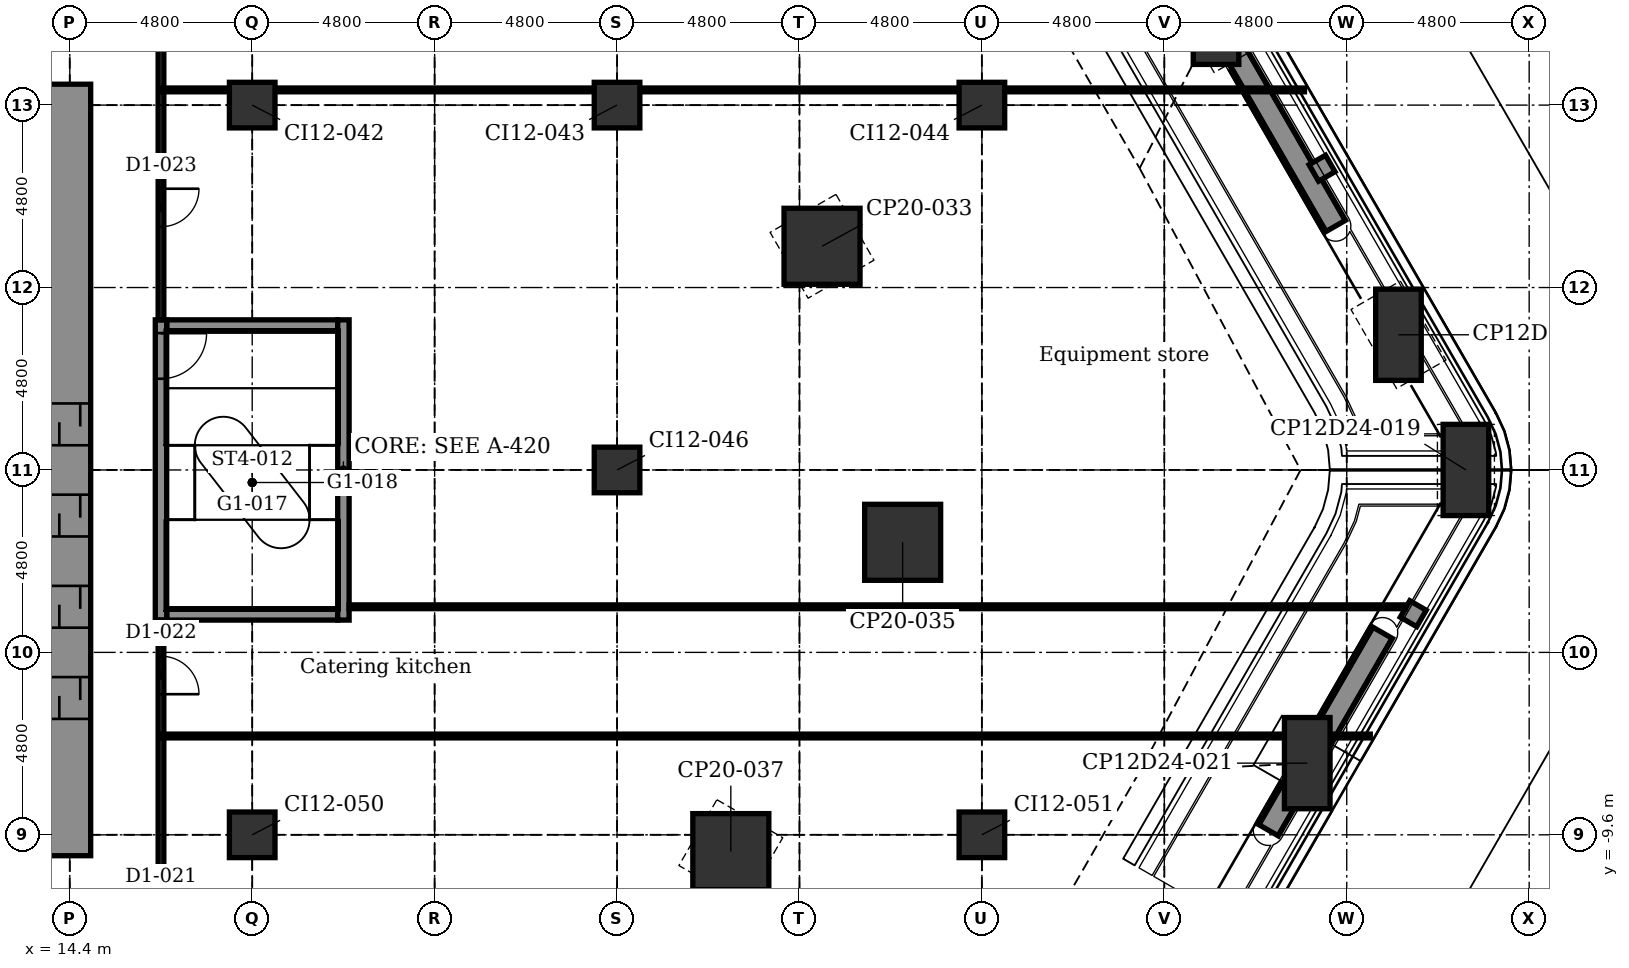
"""IFC4 building model, lengths in metres.
Left out: names, types, materials, properties, quantities, classifications, styles, units other than length and angle.
Written with IfcOpenShell. Run it as: python <this file> out.ifc"""

import sys

from ifc_helpers import new_model, si_unit, direction, frame, frame_2d, origin, origin_2d, place, context, subcontext, project, spatial, rectangle, extrude, element, fill, save


model = new_model("IFC4")
c1 = context("Model", 3, precision=1e-05, world=origin(), true_north=direction((0.0, 1.0)))
c2 = subcontext(c1, "Body", "Model", "MODEL_VIEW")
j1 = project(units=[si_unit("LENGTHUNIT", "METRE"), si_unit("PLANEANGLEUNIT", "RADIAN")], contexts=[c1])
p1 = place(None, origin())
s1 = spatial("IfcSite", under=j1, at=p1, CompositionType="ELEMENT")
p2 = place(p1, origin())
s2 = spatial("IfcBuilding", under=s1, at=p2, CompositionType="ELEMENT")
p3 = place(p2, frame((0.0, 0.0, 7.0)))
s3 = spatial("IfcBuildingStorey", under=s2, at=p3, CompositionType="ELEMENT", Elevation=7.0)
for number, where, z_axis, x_axis in (
    (1, (44.561, 11.871, -0.3), (0.0, 0.0, 1.0), (0.866, 0.5, 0.0)),
    (2, (49.361, 3.557, -0.3), (0.0, 0.0, 1.0), (0.866, 0.5, 0.0)),
    (3, (51.136, 0.0, -0.3), (0.0, 0.0, 1.0), (1.0, 0.0, 0.0)),
    (4, (46.961, -7.714, -0.3), (0.0, 0.0, 1.0), (0.5, 0.866, 0.0)),
):
    element("IfcColumn", number, at=place(p3, frame(where, z_axis=z_axis, x_axis=x_axis)), inside=s3, PredefinedType="COLUMN", context=c2, shape_type="SweptSolid", body=[
        extrude(rectangle(XDim=1.2, YDim=2.4, at=origin_2d()), origin(), (0.0, 0.0, 1.0), 5.4),
    ])
for number, where, z_axis, x_axis in (
    (5, (34.194, 5.885, -0.3), (0.0, 0.0, 1.0), (0.866, 0.5, 0.0)),
    (6, (36.315, -1.904, -0.3), (0.0, 0.0, 1.0), (1.0, 0.0, 0.0)),
    (7, (31.794, -10.042, -0.3), (0.0, 0.0, 1.0), (0.5, 0.866, 0.0)),
):
    element("IfcColumn", number, at=place(p3, frame(where, z_axis=z_axis, x_axis=x_axis)), inside=s3, PredefinedType="COLUMN", context=c2, shape_type="SweptSolid", body=[
        extrude(rectangle(XDim=2.0, YDim=2.0, at=origin_2d()), origin(), (0.0, 0.0, 1.0), 5.4),
    ])
for number, where, z_axis, x_axis in (
    (8, (19.2, -9.6, -0.3), (0.0, 0.0, 1.0), (1.0, 0.0, 0.0)),
    (9, (19.2, 9.6, -0.3), (0.0, 0.0, 1.0), (1.0, 0.0, 0.0)),
    (10, (28.8, 0.0, -0.3), (0.0, 0.0, 1.0), (1.0, 0.0, 0.0)),
    (11, (28.8, 9.6, -0.3), (0.0, 0.0, 1.0), (1.0, 0.0, 0.0)),
    (12, (38.4, -9.6, -0.3), (0.0, 0.0, 1.0), (1.0, 0.0, 0.0)),
    (13, (38.4, 9.6, -0.3), (0.0, 0.0, 1.0), (1.0, 0.0, 0.0)),
):
    element("IfcColumn", number, at=place(p3, frame(where, z_axis=z_axis, x_axis=x_axis)), inside=s3, PredefinedType="COLUMN", context=c2, shape_type="SweptSolid", body=[
        extrude(rectangle(XDim=1.2, YDim=1.2, at=origin_2d()), origin(), (0.0, 0.0, 1.0), 5.4),
    ])
for number, where, z_axis, x_axis in (
    (14, (16.95, -3.8, -0.3), (0.0, 0.0, 1.0), (1.0, 0.0, 0.0)),
    (15, (16.95, 3.8, -0.3), (0.0, 0.0, 1.0), (1.0, 0.0, 0.0)),
):
    element("IfcWall", number, at=place(p3, frame(where, z_axis=z_axis, x_axis=x_axis)), inside=s3, PredefinedType="STANDARD", context=c2, shape_type="SweptSolid", body=[
        extrude(rectangle(XDim=4.5, YDim=0.3, at=frame_2d((2.25, 0.0))), origin(), (0.0, 0.0, 1.0), 5.4),
    ])
p4 = place(p3, frame((14.4, -10.15, -0.3), z_axis=(0.0, 0.0, 1.0), x_axis=(0.0, 1.0, 0.0)))
e16 = element("IfcWall", 16, at=p4, inside=s3, PredefinedType="SHEAR", context=c2, shape_type="SweptSolid", body=[
    extrude(rectangle(XDim=20.3, YDim=1.1, at=frame_2d((10.15, 0.0))), origin(), (0.0, 0.0, 1.0), 5.4),
])
p5 = place(p4, frame((3.6, 0.0, 0.3)))
e17 = element("IfcOpeningElement", 17, at=p5, cuts=e16, PredefinedType="OPENING", context=c2, shape_type="SweptSolid", body=[
    extrude(rectangle(XDim=1.1, YDim=2.1, at=frame_2d((0.55, 1.05))), frame((0.0, 0.56, 0.0), z_axis=(0.0, -1.0, 0.0), x_axis=(1.0, 0.0, 0.0)), (0.0, 0.0, 1.0), 1.12),
])
p6 = place(p4, frame((6.0, 0.0, 0.3)))
e18 = element("IfcOpeningElement", 18, at=p6, cuts=e16, PredefinedType="OPENING", context=c2, shape_type="SweptSolid", body=[
    extrude(rectangle(XDim=1.1, YDim=2.1, at=frame_2d((0.55, 1.05))), frame((0.0, 0.56, 0.0), z_axis=(0.0, -1.0, 0.0), x_axis=(1.0, 0.0, 0.0)), (0.0, 0.0, 1.0), 1.12),
])
p7 = place(p4, frame((8.4, 0.0, 0.3)))
e19 = element("IfcOpeningElement", 19, at=p7, cuts=e16, PredefinedType="OPENING", context=c2, shape_type="SweptSolid", body=[
    extrude(rectangle(XDim=1.1, YDim=2.1, at=frame_2d((0.55, 1.05))), frame((0.0, 0.56, 0.0), z_axis=(0.0, -1.0, 0.0), x_axis=(1.0, 0.0, 0.0)), (0.0, 0.0, 1.0), 1.12),
])
p8 = place(p4, frame((10.8, 0.0, 0.3)))
e20 = element("IfcOpeningElement", 20, at=p8, cuts=e16, PredefinedType="OPENING", context=c2, shape_type="SweptSolid", body=[
    extrude(rectangle(XDim=1.1, YDim=2.1, at=frame_2d((0.55, 1.05))), frame((0.0, 0.56, 0.0), z_axis=(0.0, -1.0, 0.0), x_axis=(1.0, 0.0, 0.0)), (0.0, 0.0, 1.0), 1.12),
])
p9 = place(p3, frame((16.8, -3.95, -0.3), z_axis=(0.0, 0.0, 1.0), x_axis=(0.0, 1.0, 0.0)))
e21 = element("IfcWall", 21, at=p9, inside=s3, PredefinedType="STANDARD", context=c2, shape_type="SweptSolid", body=[
    extrude(rectangle(XDim=7.9, YDim=0.3, at=frame_2d((3.95, 0.0))), origin(), (0.0, 0.0, 1.0), 5.4),
])
p10 = place(p9, frame((6.35, 0.0, 0.3)))
e22 = element("IfcOpeningElement", 22, at=p10, cuts=e21, PredefinedType="OPENING", context=c2, shape_type="SweptSolid", body=[
    extrude(rectangle(XDim=1.2, YDim=2.1, at=frame_2d((0.6, 1.05))), frame((0.0, 0.16, 0.0), z_axis=(0.0, -1.0, 0.0), x_axis=(1.0, 0.0, 0.0)), (0.0, 0.0, 1.0), 0.32),
])
p11 = place(p3, frame((21.6, -3.95, -0.3), z_axis=(0.0, 0.0, 1.0), x_axis=(0.0, 1.0, 0.0)))
e23 = element("IfcWall", 23, at=p11, inside=s3, PredefinedType="STANDARD", context=c2, shape_type="SweptSolid", body=[
    extrude(rectangle(XDim=7.9, YDim=0.3, at=frame_2d((3.95, 0.0))), origin(), (0.0, 0.0, 1.0), 5.4),
])
for number, where, z_axis, x_axis in (
    (24, (44.708, 11.616, 5.4), (0.0, 0.0, 1.0), (0.5, -0.866, 0.0)),
    (25, (48.941, -4.284, 5.4), (0.0, 0.0, 1.0), (-0.5, -0.866, 0.0)),
):
    element("IfcWall", number, at=place(p3, frame(where, z_axis=z_axis, x_axis=x_axis)), inside=s3, PredefinedType="USERDEFINED", context=c2, shape_type="SweptSolid", body=[
        extrude(rectangle(XDim=6.0, YDim=0.6, at=frame_2d((3.0, 0.0))), origin(), (0.0, 0.0, 1.0), 0.7),
    ])
for number, where, z_axis, x_axis in (
    (26, (47.225, 8.156, 0.0), (0.0, 0.0, 1.0), (0.5, -0.866, 0.0)),
    (27, (49.875, -3.565, 0.0), (0.0, 0.0, 1.0), (-0.5, -0.866, 0.0)),
):
    element("IfcWall", number, at=place(p3, frame(where, z_axis=z_axis, x_axis=x_axis)), inside=s3, PredefinedType="SOLIDWALL", context=c2, shape_type="SweptSolid", body=[
        extrude(rectangle(XDim=0.5, YDim=0.5, at=frame_2d((0.25, 0.0))), origin(), (0.0, 0.0, 1.0), 4.8),
    ])
p12 = place(p3, frame((16.8, -13.6, 0.0), z_axis=(0.0, 0.0, 1.0), x_axis=(0.0, 1.0, 0.0)))
e28 = element("IfcWall", 28, at=p12, inside=s3, PredefinedType="PARTITIONING", context=c2, shape_type="SweptSolid", body=[
    extrude(rectangle(XDim=9.65, YDim=0.15, at=frame_2d((4.825, 0.0))), origin(), (0.0, 0.0, 1.0), 5.1),
])
p13 = place(p12, frame((1.3, 0.0, 0.0)))
e29 = element("IfcOpeningElement", 29, at=p13, cuts=e28, PredefinedType="OPENING", context=c2, shape_type="SweptSolid", body=[
    extrude(rectangle(XDim=1.0, YDim=2.1, at=frame_2d((0.5, 1.05))), frame((0.0, 0.085, 0.0), z_axis=(0.0, -1.0, 0.0), x_axis=(1.0, 0.0, 0.0)), (0.0, 0.0, 1.0), 0.17),
])
p14 = place(p12, frame((7.7, 0.0, 0.0)))
e30 = element("IfcOpeningElement", 30, at=p14, cuts=e28, PredefinedType="OPENING", context=c2, shape_type="SweptSolid", body=[
    extrude(rectangle(XDim=1.0, YDim=2.1, at=frame_2d((0.5, 1.05))), frame((0.0, 0.085, 0.0), z_axis=(0.0, -1.0, 0.0), x_axis=(1.0, 0.0, 0.0)), (0.0, 0.0, 1.0), 0.17),
])
p15 = place(p3, frame((16.8, 3.95, 0.0), z_axis=(0.0, 0.0, 1.0), x_axis=(0.0, 1.0, 0.0)))
e31 = element("IfcWall", 31, at=p15, inside=s3, PredefinedType="PARTITIONING", context=c2, shape_type="SweptSolid", body=[
    extrude(rectangle(XDim=10.85, YDim=0.15, at=frame_2d((5.425, 0.0))), origin(), (0.0, 0.0, 1.0), 5.1),
])
p16 = place(p15, frame((2.45, 0.0, 0.0)))
e32 = element("IfcOpeningElement", 32, at=p16, cuts=e31, PredefinedType="OPENING", context=c2, shape_type="SweptSolid", body=[
    extrude(rectangle(XDim=1.0, YDim=2.1, at=frame_2d((0.5, 1.05))), frame((0.0, 0.085, 0.0), z_axis=(0.0, -1.0, 0.0), x_axis=(1.0, 0.0, 0.0)), (0.0, 0.0, 1.0), 0.17),
])
p17 = place(p15, frame((7.95, 0.0, 0.0)))
e33 = element("IfcOpeningElement", 33, at=p17, cuts=e31, PredefinedType="OPENING", context=c2, shape_type="SweptSolid", body=[
    extrude(rectangle(XDim=1.0, YDim=2.1, at=frame_2d((0.5, 1.05))), frame((0.0, 0.085, 0.0), z_axis=(0.0, -1.0, 0.0), x_axis=(1.0, 0.0, 0.0)), (0.0, 0.0, 1.0), 0.17),
])
p18 = place(p3, frame((16.8, -7.0, 0.0), z_axis=(0.0, 0.0, 1.0), x_axis=(1.0, 0.0, 0.0)))
e34 = element("IfcWall", 34, at=p18, inside=s3, PredefinedType="PARTITIONING", context=c2, shape_type="SweptSolid", body=[
    extrude(rectangle(XDim=31.82, YDim=0.1, at=frame_2d((15.91, 0.0))), origin(), (0.0, 0.0, 1.0), 5.1),
])
p19 = place(p3, frame((21.75, -3.6, 0.0), z_axis=(0.0, 0.0, 1.0), x_axis=(1.0, 0.0, 0.0)))
e35 = element("IfcWall", 35, at=p19, inside=s3, PredefinedType="PARTITIONING", context=c2, shape_type="SweptSolid", body=[
    extrude(rectangle(XDim=27.788, YDim=0.1, at=frame_2d((13.894, 0.0))), origin(), (0.0, 0.0, 1.0), 5.1),
])
p20 = place(p3, frame((16.8, 10.0, 0.0), z_axis=(0.0, 0.0, 1.0), x_axis=(1.0, 0.0, 0.0)))
e36 = element("IfcWall", 36, at=p20, inside=s3, PredefinedType="PARTITIONING", context=c2, shape_type="SweptSolid", body=[
    extrude(rectangle(XDim=30.088, YDim=0.1, at=frame_2d((15.044, 0.0))), origin(), (0.0, 0.0, 1.0), 5.1),
])
p21 = place(p14, frame((1.0, 0.0, 0.0), z_axis=(0.0, 0.0, 1.0), x_axis=(-1.0, 0.0, 0.0)))
e37 = element("IfcDoor", 37, at=p21, inside=s3, OperationType="SINGLE_SWING_LEFT", PredefinedType="DOOR", context=c2, shape_type="SweptSolid", body=[
    extrude(rectangle(XDim=1.0, YDim=2.1, at=frame_2d((0.5, 1.05))), frame((0.0, 0.025, 0.0), z_axis=(0.0, -1.0, 0.0), x_axis=(1.0, 0.0, 0.0)), (0.0, 0.0, 1.0), 0.05),
])
fill(e30, e37)
p22 = place(p16, frame((1.0, 0.0, 0.0), z_axis=(0.0, 0.0, 1.0), x_axis=(-1.0, 0.0, 0.0)))
e38 = element("IfcDoor", 38, at=p22, inside=s3, OperationType="SINGLE_SWING_RIGHT", PredefinedType="DOOR", context=c2, shape_type="SweptSolid", body=[
    extrude(rectangle(XDim=1.0, YDim=2.1, at=frame_2d((0.5, 1.05))), frame((0.0, 0.025, 0.0), z_axis=(0.0, -1.0, 0.0), x_axis=(1.0, 0.0, 0.0)), (0.0, 0.0, 1.0), 0.05),
])
fill(e32, e38)
p23 = place(p5, origin())
e39 = element("IfcDoor", 39, at=p23, inside=s3, OperationType="DOUBLE_DOOR_SLIDING", PredefinedType="DOOR", context=c2, shape_type="SweptSolid", body=[
    extrude(rectangle(XDim=1.1, YDim=2.1, at=frame_2d((0.55, 1.05))), frame((0.0, 0.025, 0.0), z_axis=(0.0, -1.0, 0.0), x_axis=(1.0, 0.0, 0.0)), (0.0, 0.0, 1.0), 0.05),
])
fill(e17, e39)
p24 = place(p6, origin())
e40 = element("IfcDoor", 40, at=p24, inside=s3, OperationType="DOUBLE_DOOR_SLIDING", PredefinedType="DOOR", context=c2, shape_type="SweptSolid", body=[
    extrude(rectangle(XDim=1.1, YDim=2.1, at=frame_2d((0.55, 1.05))), frame((0.0, 0.025, 0.0), z_axis=(0.0, -1.0, 0.0), x_axis=(1.0, 0.0, 0.0)), (0.0, 0.0, 1.0), 0.05),
])
fill(e18, e40)
p25 = place(p7, origin())
e41 = element("IfcDoor", 41, at=p25, inside=s3, OperationType="DOUBLE_DOOR_SLIDING", PredefinedType="DOOR", context=c2, shape_type="SweptSolid", body=[
    extrude(rectangle(XDim=1.1, YDim=2.1, at=frame_2d((0.55, 1.05))), frame((0.0, 0.025, 0.0), z_axis=(0.0, -1.0, 0.0), x_axis=(1.0, 0.0, 0.0)), (0.0, 0.0, 1.0), 0.05),
])
fill(e19, e41)
p26 = place(p8, origin())
e42 = element("IfcDoor", 42, at=p26, inside=s3, OperationType="DOUBLE_DOOR_SLIDING", PredefinedType="DOOR", context=c2, shape_type="SweptSolid", body=[
    extrude(rectangle(XDim=1.1, YDim=2.1, at=frame_2d((0.55, 1.05))), frame((0.0, 0.025, 0.0), z_axis=(0.0, -1.0, 0.0), x_axis=(1.0, 0.0, 0.0)), (0.0, 0.0, 1.0), 0.05),
])
fill(e20, e42)
p27 = place(p10, frame((1.2, 0.0, 0.0), z_axis=(0.0, 0.0, 1.0), x_axis=(-1.0, 0.0, 0.0)))
e43 = element("IfcDoor", 43, at=p27, inside=s3, OperationType="SINGLE_SWING_RIGHT", PredefinedType="DOOR", context=c2, shape_type="SweptSolid", body=[
    extrude(rectangle(XDim=1.2, YDim=2.1, at=frame_2d((0.6, 1.05))), frame((0.0, 0.025, 0.0), z_axis=(0.0, -1.0, 0.0), x_axis=(1.0, 0.0, 0.0)), (0.0, 0.0, 1.0), 0.05),
])
fill(e22, e43)
save(model, sys.argv[1])
